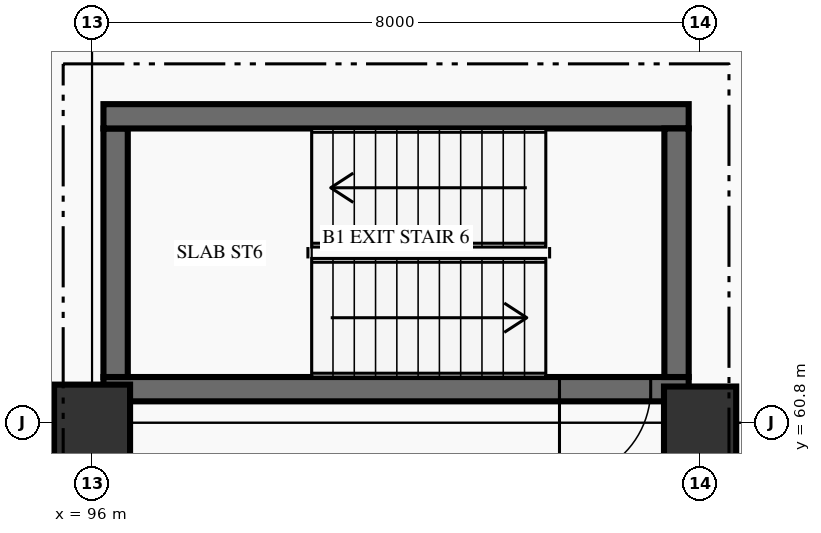
"""IFC4 building model, lengths in metres.
Left out: names, types, materials, properties, quantities, classifications, styles, units other than length and angle.
Written with IfcOpenShell. Run it as: python <this file> out.ifc"""

import sys

from ifc_helpers import new_model, si_unit, direction, frame, frame_2d, origin, origin_2d, place, context, subcontext, project, spatial, rectangle, extrude, element, fill, save


model = new_model("IFC4")
c1 = context("Model", 3, precision=1e-05, world=origin(), true_north=direction((0.0, 1.0)))
c2 = subcontext(c1, "Body", "Model", "MODEL_VIEW")
j1 = project(units=[si_unit("LENGTHUNIT", "METRE"), si_unit("PLANEANGLEUNIT", "RADIAN")], contexts=[c1])
p1 = place(None, origin())
s1 = spatial("IfcSite", under=j1, at=p1, CompositionType="ELEMENT")
p2 = place(p1, origin())
s2 = spatial("IfcBuilding", under=s1, at=p2, CompositionType="ELEMENT")
p3 = place(p2, frame((0.0, 0.0, -4.5)))
s3 = spatial("IfcBuildingStorey", under=s2, at=p3, CompositionType="ELEMENT", Elevation=-4.5)
p4 = place(p3, frame((96.0, 60.8, 0.0), z_axis=(0.0, 0.0, 1.0), x_axis=(1.0, 0.0, 0.0)))
e1 = element("IfcColumn", 1, at=p4, inside=s3, PredefinedType="COLUMN", context=c2, shape_type="SweptSolid", body=[
    extrude(rectangle(XDim=1.0, YDim=1.0, at=origin_2d()), origin(), (0.0, 0.0, 1.0), 4.5),
])
p5 = place(p3, frame((104.0, 60.8, 0.0), z_axis=(0.0, 0.0, 1.0), x_axis=(1.0, 0.0, 0.0)))
e2 = element("IfcColumn", 2, at=p5, inside=s3, PredefinedType="COLUMN", context=c2, shape_type="SweptSolid", body=[
    extrude(rectangle(XDim=0.95, YDim=0.95, at=origin_2d()), origin(), (0.0, 0.0, 1.0), 4.5),
])
p6 = place(p3, frame((103.85, 61.24, 0.0), z_axis=(0.0, 0.0, 1.0), x_axis=(-1.0, 0.0, 0.0)))
e3 = element("IfcWall", 3, at=p6, inside=s3, PredefinedType="SHEAR", context=c2, shape_type="SweptSolid", body=[
    extrude(rectangle(XDim=7.7, YDim=0.32, at=frame_2d((3.85, 0.0))), origin(), (0.0, 0.0, 1.0), 4.5),
])
p7 = place(p6, frame((0.5, 0.0, 0.0)))
e4 = element("IfcOpeningElement", 4, at=p7, cuts=e3, PredefinedType="OPENING", context=c2, shape_type="SweptSolid", body=[
    extrude(rectangle(XDim=1.2, YDim=2.2, at=frame_2d((0.6, 1.1))), frame((0.0, 0.17, 0.0), z_axis=(0.0, -1.0, 0.0), x_axis=(1.0, 0.0, 0.0)), (0.0, 0.0, 1.0), 0.34),
])
p8 = place(p3, frame((96.31, 61.4, 0.0), z_axis=(0.0, 0.0, 1.0), x_axis=(0.0, 1.0, 0.0)))
e5 = element("IfcWall", 5, at=p8, inside=s3, PredefinedType="SHEAR", context=c2, shape_type="SweptSolid", body=[
    extrude(rectangle(XDim=3.27, YDim=0.32, at=frame_2d((1.635, 0.0))), origin(), (0.0, 0.0, 1.0), 4.5),
])
p9 = place(p3, frame((96.15, 64.83, 0.0), z_axis=(0.0, 0.0, 1.0), x_axis=(1.0, 0.0, 0.0)))
e6 = element("IfcWall", 6, at=p9, inside=s3, PredefinedType="SHEAR", context=c2, shape_type="SweptSolid", body=[
    extrude(rectangle(XDim=7.7, YDim=0.32, at=frame_2d((3.85, 0.0))), origin(), (0.0, 0.0, 1.0), 4.5),
])
p10 = place(p3, frame((103.69, 64.67, 0.0), z_axis=(0.0, 0.0, 1.0), x_axis=(0.0, -1.0, 0.0)))
e7 = element("IfcWall", 7, at=p10, inside=s3, PredefinedType="SHEAR", context=c2, shape_type="SweptSolid", body=[
    extrude(rectangle(XDim=3.27, YDim=0.32, at=frame_2d((1.635, 0.0))), origin(), (0.0, 0.0, 1.0), 4.5),
])
p11 = place(p7, origin())
e8 = element("IfcDoor", 8, at=p11, inside=s3, OperationType="SINGLE_SWING_RIGHT", PredefinedType="DOOR", context=c2, shape_type="SweptSolid", body=[
    extrude(rectangle(XDim=1.2, YDim=2.2, at=frame_2d((0.6, 1.1))), frame((0.0, 0.025, 0.0), z_axis=(0.0, -1.0, 0.0), x_axis=(1.0, 0.0, 0.0)), (0.0, 0.0, 1.0), 0.05),
])
fill(e4, e8)
save(model, sys.argv[1])
